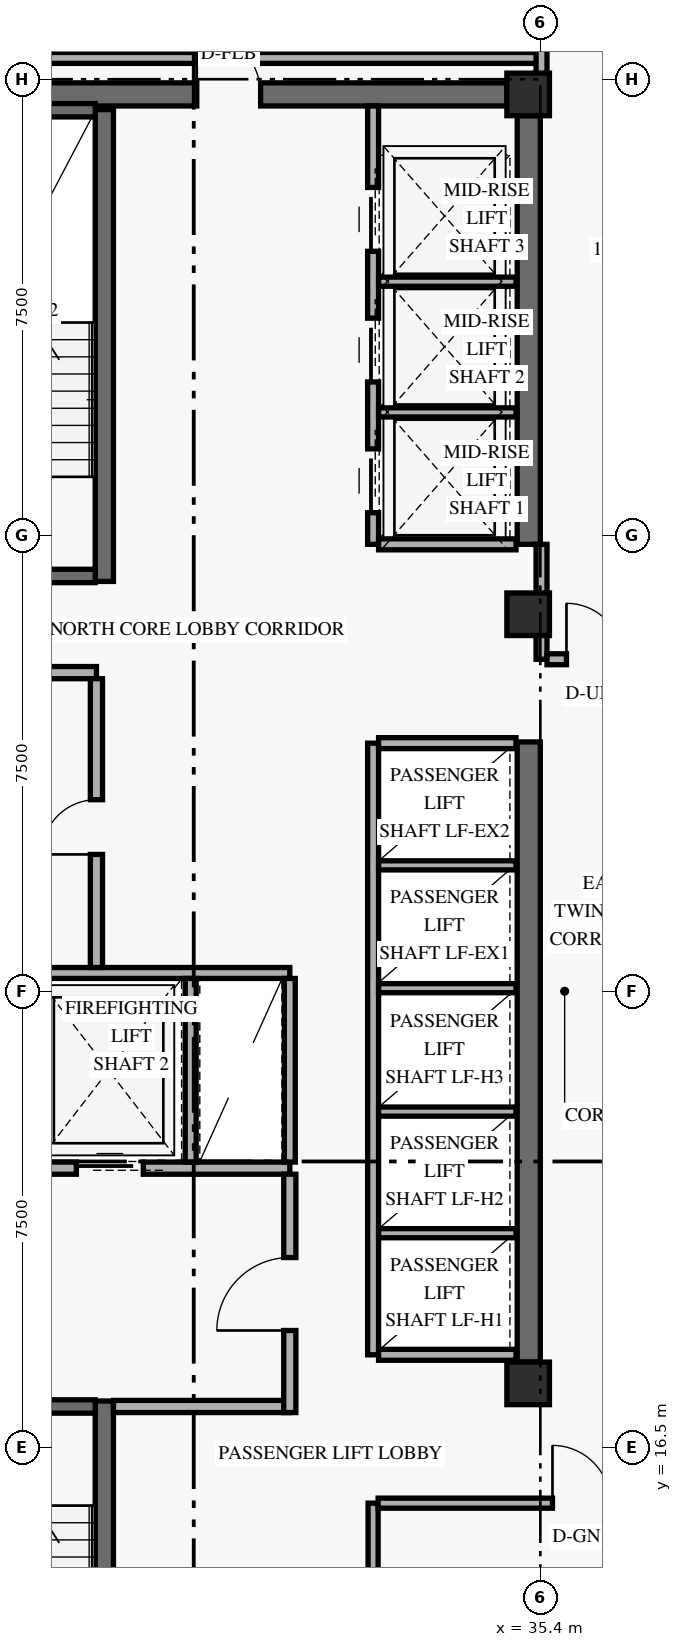
"""IFC4 building model, lengths in metres.
Left out: names, types, materials, properties, quantities, classifications, styles, units other than length and angle.
Written with IfcOpenShell. Run it as: python <this file> out.ifc"""

import sys

from ifc_helpers import new_model, si_unit, direction, frame, frame_2d, origin, origin_2d, place, context, subcontext, project, spatial, rectangle, extrude, element, fill, save


model = new_model("IFC4")
c1 = context("Model", 3, precision=1e-05, world=origin(), true_north=direction((0.0, 1.0)))
c2 = subcontext(c1, "Body", "Model", "MODEL_VIEW")
j1 = project(units=[si_unit("LENGTHUNIT", "METRE"), si_unit("PLANEANGLEUNIT", "RADIAN")], contexts=[c1])
p1 = place(None, origin())
s1 = spatial("IfcSite", under=j1, at=p1, CompositionType="ELEMENT")
p2 = place(p1, origin())
s2 = spatial("IfcBuilding", under=s1, at=p2, CompositionType="ELEMENT")
p3 = place(p2, frame((0.0, 0.0, 166.2)))
s3 = spatial("IfcBuildingStorey", under=s2, at=p3, CompositionType="ELEMENT", Elevation=166.2)
p4 = place(p3, frame((35.21, 17.9, 0.0), z_axis=(0.0, 0.0, 1.0), x_axis=(0.0, 1.0, 0.0)))
e1 = element("IfcWall", 1, at=p4, inside=s3, PredefinedType="SHEAR", context=c2, shape_type="SweptSolid", body=[
    extrude(rectangle(XDim=10.2, YDim=0.38, at=frame_2d((5.1, 0.0))), origin(), (0.0, 0.0, 1.0), 2.748),
])
p5 = place(p3, frame((35.21, 31.35, 0.0), z_axis=(0.0, 0.0, 1.0), x_axis=(0.0, 1.0, 0.0)))
e2 = element("IfcWall", 2, at=p5, inside=s3, PredefinedType="SHEAR", context=c2, shape_type="SweptSolid", body=[
    extrude(rectangle(XDim=7.05, YDim=0.38, at=frame_2d((3.525, 0.0))), origin(), (0.0, 0.0, 1.0), 2.748),
])
p6 = place(p3, frame((24.55, 38.75, 0.0), z_axis=(0.0, 0.0, 1.0), x_axis=(1.0, 0.0, 0.0)))
e3 = element("IfcWall", 3, at=p6, inside=s3, PredefinedType="SHEAR", context=c2, shape_type="SweptSolid", body=[
    extrude(rectangle(XDim=10.3, YDim=0.38, at=frame_2d((5.15, 0.0))), origin(), (0.0, 0.0, 1.0), 3.36),
])
p7 = place(p6, frame((5.2, 0.0, 0.0)))
e4 = element("IfcOpeningElement", 4, at=p7, cuts=e3, PredefinedType="OPENING", context=c2, shape_type="SweptSolid", body=[
    extrude(rectangle(XDim=1.05, YDim=2.15, at=frame_2d((0.525, 1.075))), frame((0.0, 0.2, 0.0), z_axis=(0.0, -1.0, 0.0), x_axis=(1.0, 0.0, 0.0)), (0.0, 0.0, 1.0), 0.4),
])
p8 = place(p3, frame((28.23, 9.5, 0.0), z_axis=(0.0, 0.0, 1.0), x_axis=(0.0, 1.0, 0.0)))
e5 = element("IfcWall", 5, at=p8, inside=s3, PredefinedType="SHEAR", context=c2, shape_type="SweptSolid", body=[
    extrude(rectangle(XDim=7.76, YDim=0.3, at=frame_2d((3.88, 0.0))), origin(), (0.0, 0.0, 1.0), 3.36),
])
p9 = place(p3, frame((24.92, 17.17, 0.0), z_axis=(0.0, 0.0, 1.0), x_axis=(1.0, 0.0, 0.0)))
e6 = element("IfcWall", 6, at=p9, inside=s3, PredefinedType="SHEAR", context=c2, shape_type="SweptSolid", body=[
    extrude(rectangle(XDim=3.16, YDim=0.22, at=frame_2d((1.58, 0.0))), origin(), (0.0, 0.0, 1.0), 3.36),
])
p10 = place(p9, frame((0.78, 0.0, 0.0)))
e7 = element("IfcOpeningElement", 7, at=p10, cuts=e6, PredefinedType="OPENING", context=c2, shape_type="SweptSolid", body=[
    extrude(rectangle(XDim=1.05, YDim=2.15, at=frame_2d((0.525, 1.075))), frame((0.0, 0.12, 0.0), z_axis=(0.0, -1.0, 0.0), x_axis=(1.0, 0.0, 0.0)), (0.0, 0.0, 1.0), 0.24),
])
p11 = place(p3, frame((28.23, 30.74, 0.0), z_axis=(0.0, 0.0, 1.0), x_axis=(0.0, 1.0, 0.0)))
e8 = element("IfcWall", 8, at=p11, inside=s3, PredefinedType="SHEAR", context=c2, shape_type="SweptSolid", body=[
    extrude(rectangle(XDim=7.76, YDim=0.3, at=frame_2d((3.88, 0.0))), origin(), (0.0, 0.0, 1.0), 3.36),
])
p12 = place(p3, frame((24.92, 30.83, 0.0), z_axis=(0.0, 0.0, 1.0), x_axis=(1.0, 0.0, 0.0)))
e9 = element("IfcWall", 9, at=p12, inside=s3, PredefinedType="SHEAR", context=c2, shape_type="SweptSolid", body=[
    extrude(rectangle(XDim=3.16, YDim=0.22, at=frame_2d((1.58, 0.0))), origin(), (0.0, 0.0, 1.0), 3.36),
])
p13 = place(p12, frame((0.78, 0.0, 0.0)))
e10 = element("IfcOpeningElement", 10, at=p13, cuts=e9, PredefinedType="OPENING", context=c2, shape_type="SweptSolid", body=[
    extrude(rectangle(XDim=1.05, YDim=2.15, at=frame_2d((0.525, 1.075))), frame((0.0, 0.12, 0.0), z_axis=(0.0, -1.0, 0.0), x_axis=(1.0, 0.0, 0.0)), (0.0, 0.0, 1.0), 0.24),
])
p14 = place(p3, frame((24.92, 38.49, 0.0), z_axis=(0.0, 0.0, 1.0), x_axis=(1.0, 0.0, 0.0)))
e11 = element("IfcWall", 11, at=p14, inside=s3, PredefinedType="SHEAR", context=c2, shape_type="SweptSolid", body=[
    extrude(rectangle(XDim=3.16, YDim=0.22, at=frame_2d((1.58, 0.0))), origin(), (0.0, 0.0, 1.0), 3.36),
])
for number, where, z_axis, x_axis in (
    (12, (35.2, 17.55, 0.0), (0.0, 0.0, 1.0), (1.0, 0.0, 0.0)),
    (13, (35.2, 30.2, 0.0), (0.0, 0.0, 1.0), (1.0, 0.0, 0.0)),
    (14, (35.2, 38.75, 0.0), (0.0, 0.0, 1.0), (1.0, 0.0, 0.0)),
):
    element("IfcColumn", number, at=place(p3, frame(where, z_axis=z_axis, x_axis=x_axis)), inside=s3, PredefinedType="COLUMN", context=c2, shape_type="SweptSolid", body=[
        extrude(rectangle(XDim=0.7, YDim=0.7, at=origin_2d()), origin(), (0.0, 0.0, 1.0), 3.6),
    ])
p15 = place(p3, frame((24.45, 21.09, 0.0), z_axis=(0.0, 0.0, 1.0), x_axis=(1.0, 0.0, 0.0)))
e15 = element("IfcWall", 15, at=p15, inside=s3, PredefinedType="STANDARD", context=c2, shape_type="SweptSolid", body=[
    extrude(rectangle(XDim=6.83, YDim=0.2, at=frame_2d((3.415, 0.0))), origin(), (0.0, 0.0, 1.0), 3.36),
])
p16 = place(p15, frame((0.72, 0.0, 0.0)))
e16 = element("IfcOpeningElement", 16, at=p16, cuts=e15, PredefinedType="OPENING", context=c2, shape_type="SweptSolid", body=[
    extrude(rectangle(XDim=1.1, YDim=2.2, at=frame_2d((0.55, 1.1))), frame((0.0, 0.11, 0.0), z_axis=(0.0, -1.0, 0.0), x_axis=(1.0, 0.0, 0.0)), (0.0, 0.0, 1.0), 0.22),
])
p17 = place(p15, frame((3.32, 0.0, 0.0)))
e17 = element("IfcOpeningElement", 17, at=p17, cuts=e15, PredefinedType="OPENING", context=c2, shape_type="SweptSolid", body=[
    extrude(rectangle(XDim=1.1, YDim=2.2, at=frame_2d((0.55, 1.1))), frame((0.0, 0.11, 0.0), z_axis=(0.0, -1.0, 0.0), x_axis=(1.0, 0.0, 0.0)), (0.0, 0.0, 1.0), 0.22),
])
p18 = place(p3, frame((28.38, 17.17, 0.0), z_axis=(0.0, 0.0, 1.0), x_axis=(1.0, 0.0, 0.0)))
e18 = element("IfcWall", 18, at=p18, inside=s3, PredefinedType="STANDARD", context=c2, shape_type="SweptSolid", body=[
    extrude(rectangle(XDim=2.9, YDim=0.2, at=frame_2d((1.45, 0.0))), origin(), (0.0, 0.0, 1.0), 3.36),
])
p19 = place(p3, frame((31.28, 17.07, 0.0), z_axis=(0.0, 0.0, 1.0), x_axis=(0.0, 1.0, 0.0)))
e19 = element("IfcWall", 19, at=p19, inside=s3, PredefinedType="STANDARD", context=c2, shape_type="SweptSolid", body=[
    extrude(rectangle(XDim=3.92, YDim=0.2, at=frame_2d((1.96, 0.0))), origin(), (0.0, 0.0, 1.0), 2.73),
])
p20 = place(p19, frame((1.35, 0.0, 0.0)))
e20 = element("IfcOpeningElement", 20, at=p20, cuts=e19, PredefinedType="OPENING", context=c2, shape_type="SweptSolid", body=[
    extrude(rectangle(XDim=1.2, YDim=2.15, at=frame_2d((0.6, 1.075))), frame((0.0, 0.11, 0.0), z_axis=(0.0, -1.0, 0.0), x_axis=(1.0, 0.0, 0.0)), (0.0, 0.0, 1.0), 0.22),
])
p21 = place(p3, frame((24.45, 24.3, 0.0), z_axis=(0.0, 0.0, 1.0), x_axis=(1.0, 0.0, 0.0)))
e21 = element("IfcWall", 21, at=p21, inside=s3, PredefinedType="STANDARD", context=c2, shape_type="SweptSolid", body=[
    extrude(rectangle(XDim=6.83, YDim=0.18, at=frame_2d((3.415, 0.0))), origin(), (0.0, 0.0, 1.0), 3.36),
])
for number, where, z_axis, x_axis in (
    (22, (29.65, 21.19, 0.0), (0.0, 0.0, 1.0), (0.0, 1.0, 0.0)),
    (23, (31.28, 21.19, 0.0), (0.0, 0.0, 1.0), (0.0, 1.0, 0.0)),
):
    element("IfcWall", number, at=place(p3, frame(where, z_axis=z_axis, x_axis=x_axis)), inside=s3, PredefinedType="STANDARD", context=c2, shape_type="SweptSolid", body=[
        extrude(rectangle(XDim=3.02, YDim=0.18, at=frame_2d((1.51, 0.0))), origin(), (0.0, 0.0, 1.0), 3.36),
    ])
p22 = place(p3, frame((24.45, 29.24, 0.0), z_axis=(0.0, 0.0, 1.0), x_axis=(1.0, 0.0, 0.0)))
e24 = element("IfcWall", 24, at=p22, inside=s3, PredefinedType="STANDARD", context=c2, shape_type="SweptSolid", body=[
    extrude(rectangle(XDim=3.65, YDim=0.2, at=frame_2d((1.825, 0.0))), origin(), (0.0, 0.0, 1.0), 3.36),
])
p23 = place(p3, frame((28.1, 24.39, 0.0), z_axis=(0.0, 0.0, 1.0), x_axis=(0.0, 1.0, 0.0)))
e25 = element("IfcWall", 25, at=p23, inside=s3, PredefinedType="STANDARD", context=c2, shape_type="SweptSolid", body=[
    extrude(rectangle(XDim=4.75, YDim=0.2, at=frame_2d((2.375, 0.0))), origin(), (0.0, 0.0, 1.0), 3.36),
])
p24 = place(p23, frame((1.86, 0.0, 0.0)))
e26 = element("IfcOpeningElement", 26, at=p24, cuts=e25, PredefinedType="OPENING", context=c2, shape_type="SweptSolid", body=[
    extrude(rectangle(XDim=0.9, YDim=2.1, at=frame_2d((0.45, 1.05))), frame((0.0, 0.11, 0.0), z_axis=(0.0, -1.0, 0.0), x_axis=(1.0, 0.0, 0.0)), (0.0, 0.0, 1.0), 0.22),
])
p25 = place(p3, frame((32.65, 18.02, 0.0), z_axis=(0.0, 0.0, 1.0), x_axis=(0.0, 1.0, 0.0)))
e27 = element("IfcWall", 27, at=p25, inside=s3, PredefinedType="STANDARD", context=c2, shape_type="SweptSolid", body=[
    extrude(rectangle(XDim=10.06, YDim=0.18, at=frame_2d((5.03, 0.0))), origin(), (0.0, 0.0, 1.0), 3.36),
])
for number, where, z_axis, x_axis in (
    (28, (32.74, 18.02, 0.0), (0.0, 0.0, 1.0), (1.0, 0.0, 0.0)),
    (29, (32.74, 28.08, 0.0), (0.0, 0.0, 1.0), (1.0, 0.0, 0.0)),
):
    element("IfcWall", number, at=place(p3, frame(where, z_axis=z_axis, x_axis=x_axis)), inside=s3, PredefinedType="STANDARD", context=c2, shape_type="SweptSolid", body=[
        extrude(rectangle(XDim=2.26, YDim=0.18, at=frame_2d((1.13, 0.0))), origin(), (0.0, 0.0, 1.0), 3.36),
    ])
for number, where, z_axis, x_axis in (
    (30, (32.74, 20.02, 0.0), (0.0, 0.0, 1.0), (1.0, 0.0, 0.0)),
    (31, (32.74, 22.02, 0.0), (0.0, 0.0, 1.0), (1.0, 0.0, 0.0)),
    (32, (32.74, 24.05, 0.0), (0.0, 0.0, 1.0), (1.0, 0.0, 0.0)),
    (33, (32.74, 26.07, 0.0), (0.0, 0.0, 1.0), (1.0, 0.0, 0.0)),
):
    element("IfcWall", number, at=place(p3, frame(where, z_axis=z_axis, x_axis=x_axis)), inside=s3, PredefinedType="STANDARD", context=c2, shape_type="SweptSolid", body=[
        extrude(rectangle(XDim=2.26, YDim=0.15, at=frame_2d((1.13, 0.0))), origin(), (0.0, 0.0, 1.0), 3.36),
    ])
p26 = place(p3, frame((32.65, 31.35, 0.0), z_axis=(0.0, 0.0, 1.0), x_axis=(0.0, 1.0, 0.0)))
e34 = element("IfcWall", 34, at=p26, inside=s3, PredefinedType="STANDARD", context=c2, shape_type="SweptSolid", body=[
    extrude(rectangle(XDim=7.21, YDim=0.18, at=frame_2d((3.605, 0.0))), origin(), (0.0, 0.0, 1.0), 3.36),
])
p27 = place(p26, frame((0.52, 0.0, 0.0)))
e35 = element("IfcOpeningElement", 35, at=p27, cuts=e34, PredefinedType="OPENING", context=c2, shape_type="SweptSolid", body=[
    extrude(rectangle(XDim=1.05, YDim=2.2, at=frame_2d((0.525, 1.1))), frame((0.0, 0.1, 0.0), z_axis=(0.0, -1.0, 0.0), x_axis=(1.0, 0.0, 0.0)), (0.0, 0.0, 1.0), 0.2),
])
p28 = place(p26, frame((2.67, 0.0, 0.0)))
e36 = element("IfcOpeningElement", 36, at=p28, cuts=e34, PredefinedType="OPENING", context=c2, shape_type="SweptSolid", body=[
    extrude(rectangle(XDim=1.05, YDim=2.2, at=frame_2d((0.525, 1.1))), frame((0.0, 0.1, 0.0), z_axis=(0.0, -1.0, 0.0), x_axis=(1.0, 0.0, 0.0)), (0.0, 0.0, 1.0), 0.2),
])
p29 = place(p26, frame((4.82, 0.0, 0.0)))
e37 = element("IfcOpeningElement", 37, at=p29, cuts=e34, PredefinedType="OPENING", context=c2, shape_type="SweptSolid", body=[
    extrude(rectangle(XDim=1.05, YDim=2.2, at=frame_2d((0.525, 1.1))), frame((0.0, 0.1, 0.0), z_axis=(0.0, -1.0, 0.0), x_axis=(1.0, 0.0, 0.0)), (0.0, 0.0, 1.0), 0.2),
])
p30 = place(p3, frame((32.74, 31.35, 0.0), z_axis=(0.0, 0.0, 1.0), x_axis=(1.0, 0.0, 0.0)))
e38 = element("IfcWall", 38, at=p30, inside=s3, PredefinedType="STANDARD", context=c2, shape_type="SweptSolid", body=[
    extrude(rectangle(XDim=2.26, YDim=0.18, at=frame_2d((1.13, 0.0))), origin(), (0.0, 0.0, 1.0), 3.36),
])
for number, where, z_axis, x_axis in (
    (39, (32.74, 33.52, 0.0), (0.0, 0.0, 1.0), (1.0, 0.0, 0.0)),
    (40, (32.74, 35.67, 0.0), (0.0, 0.0, 1.0), (1.0, 0.0, 0.0)),
):
    element("IfcWall", number, at=place(p3, frame(where, z_axis=z_axis, x_axis=x_axis)), inside=s3, PredefinedType="STANDARD", context=c2, shape_type="SweptSolid", body=[
        extrude(rectangle(XDim=2.26, YDim=0.15, at=frame_2d((1.13, 0.0))), origin(), (0.0, 0.0, 1.0), 3.36),
    ])
p31 = place(p3, frame((32.65, 9.5, 0.0), z_axis=(0.0, 0.0, 1.0), x_axis=(0.0, 1.0, 0.0)))
e41 = element("IfcWall", 41, at=p31, inside=s3, PredefinedType="PARTITIONING", context=c2, shape_type="SweptSolid", body=[
    extrude(rectangle(XDim=6.08, YDim=0.165, at=frame_2d((3.04, 0.0))), origin(), (0.0, 0.0, 1.0), 3.36),
])
p32 = place(p3, frame((32.732, 15.58, 0.0), z_axis=(0.0, 0.0, 1.0), x_axis=(1.0, 0.0, 0.0)))
e42 = element("IfcWall", 42, at=p32, inside=s3, PredefinedType="PARTITIONING", context=c2, shape_type="SweptSolid", body=[
    extrude(rectangle(XDim=5.218, YDim=0.165, at=frame_2d((2.609, 0.0))), origin(), (0.0, 0.0, 1.0), 2.73),
])
p33 = place(p32, frame((2.867, 0.0, 0.0)))
e43 = element("IfcOpeningElement", 43, at=p33, cuts=e42, PredefinedType="OPENING", context=c2, shape_type="SweptSolid", body=[
    extrude(rectangle(XDim=0.95, YDim=2.15, at=frame_2d((0.475, 1.075))), frame((0.0, 0.093, 0.0), z_axis=(0.0, -1.0, 0.0), x_axis=(1.0, 0.0, 0.0)), (0.0, 0.0, 1.0), 0.185),
])
p34 = place(p3, frame((35.42, 29.46, 0.0), z_axis=(0.0, 0.0, 1.0), x_axis=(0.0, 1.0, 0.0)))
e44 = element("IfcWall", 44, at=p34, inside=s3, PredefinedType="STANDARD", context=c2, shape_type="SweptSolid", body=[
    extrude(rectangle(XDim=1.89, YDim=0.18, at=frame_2d((0.945, 0.0))), origin(), (0.0, 0.0, 1.0), 2.73),
])
p35 = place(p3, frame((35.51, 29.46, 0.0), z_axis=(0.0, 0.0, 1.0), x_axis=(1.0, 0.0, 0.0)))
e45 = element("IfcWall", 45, at=p35, inside=s3, PredefinedType="STANDARD", context=c2, shape_type="SweptSolid", body=[
    extrude(rectangle(XDim=10.956, YDim=0.18, at=frame_2d((5.478, 0.0))), origin(), (0.0, 0.0, 1.0), 2.73),
])
p36 = place(p35, frame((0.32, 0.0, 0.0)))
e46 = element("IfcOpeningElement", 46, at=p36, cuts=e45, PredefinedType="OPENING", context=c2, shape_type="SweptSolid", body=[
    extrude(rectangle(XDim=0.92, YDim=2.15, at=frame_2d((0.46, 1.075))), frame((0.0, 0.1, 0.0), z_axis=(0.0, -1.0, 0.0), x_axis=(1.0, 0.0, 0.0)), (0.0, 0.0, 1.0), 0.2),
])
p37 = place(p3, frame((23.85, 39.35, 0.0), z_axis=(0.0, 0.0, 1.0), x_axis=(1.0, 0.0, 0.0)))
e47 = element("IfcWall", 47, at=p37, inside=s3, PredefinedType="STANDARD", context=c2, shape_type="SweptSolid", body=[
    extrude(rectangle(XDim=11.57, YDim=0.18, at=frame_2d((5.785, 0.0))), origin(), (0.0, 0.0, 1.0), 2.73),
])
p38 = place(p3, frame((35.42, 38.75, 0.0), z_axis=(0.0, 0.0, 1.0), x_axis=(0.0, 1.0, 0.0)))
e48 = element("IfcWall", 48, at=p38, inside=s3, PredefinedType="PARTITIONING", context=c2, shape_type="SweptSolid", body=[
    extrude(rectangle(XDim=4.97, YDim=0.18, at=frame_2d((2.485, 0.0))), origin(), (0.0, 0.0, 1.0), 2.73),
])
p39 = place(p17, origin())
e49 = element("IfcDoor", 49, at=p39, inside=s3, OperationType="SLIDING_TO_LEFT", PredefinedType="DOOR", context=c2, shape_type="SweptSolid", body=[
    extrude(rectangle(XDim=1.1, YDim=2.2, at=frame_2d((0.55, 1.1))), frame((0.0, 0.025, 0.0), z_axis=(0.0, -1.0, 0.0), x_axis=(1.0, 0.0, 0.0)), (0.0, 0.0, 1.0), 0.05),
])
fill(e17, e49)
p40 = place(p20, origin())
e50 = element("IfcDoor", 50, at=p40, inside=s3, OperationType="SINGLE_SWING_LEFT", PredefinedType="DOOR", context=c2, shape_type="SweptSolid", body=[
    extrude(rectangle(XDim=1.2, YDim=2.15, at=frame_2d((0.6, 1.075))), frame((0.0, 0.025, 0.0), z_axis=(0.0, -1.0, 0.0), x_axis=(1.0, 0.0, 0.0)), (0.0, 0.0, 1.0), 0.05),
])
fill(e20, e50)
p41 = place(p24, origin())
e51 = element("IfcDoor", 51, at=p41, inside=s3, OperationType="SINGLE_SWING_LEFT", PredefinedType="DOOR", context=c2, shape_type="SweptSolid", body=[
    extrude(rectangle(XDim=0.9, YDim=2.1, at=frame_2d((0.45, 1.05))), frame((0.0, 0.025, 0.0), z_axis=(0.0, -1.0, 0.0), x_axis=(1.0, 0.0, 0.0)), (0.0, 0.0, 1.0), 0.05),
])
fill(e26, e51)
p42 = place(p27, origin())
e52 = element("IfcDoor", 52, at=p42, inside=s3, OperationType="SLIDING_TO_LEFT", PredefinedType="DOOR", context=c2, shape_type="SweptSolid", body=[
    extrude(rectangle(XDim=1.05, YDim=2.2, at=frame_2d((0.525, 1.1))), frame((0.0, 0.025, 0.0), z_axis=(0.0, -1.0, 0.0), x_axis=(1.0, 0.0, 0.0)), (0.0, 0.0, 1.0), 0.05),
])
fill(e35, e52)
p43 = place(p28, origin())
e53 = element("IfcDoor", 53, at=p43, inside=s3, OperationType="SLIDING_TO_LEFT", PredefinedType="DOOR", context=c2, shape_type="SweptSolid", body=[
    extrude(rectangle(XDim=1.05, YDim=2.2, at=frame_2d((0.525, 1.1))), frame((0.0, 0.025, 0.0), z_axis=(0.0, -1.0, 0.0), x_axis=(1.0, 0.0, 0.0)), (0.0, 0.0, 1.0), 0.05),
])
fill(e36, e53)
p44 = place(p29, origin())
e54 = element("IfcDoor", 54, at=p44, inside=s3, OperationType="SLIDING_TO_LEFT", PredefinedType="DOOR", context=c2, shape_type="SweptSolid", body=[
    extrude(rectangle(XDim=1.05, YDim=2.2, at=frame_2d((0.525, 1.1))), frame((0.0, 0.025, 0.0), z_axis=(0.0, -1.0, 0.0), x_axis=(1.0, 0.0, 0.0)), (0.0, 0.0, 1.0), 0.05),
])
fill(e37, e54)
p45 = place(p33, origin())
e55 = element("IfcDoor", 55, at=p45, inside=s3, OperationType="SINGLE_SWING_LEFT", PredefinedType="DOOR", context=c2, shape_type="SweptSolid", body=[
    extrude(rectangle(XDim=0.95, YDim=2.15, at=frame_2d((0.475, 1.075))), frame((0.0, 0.025, 0.0), z_axis=(0.0, -1.0, 0.0), x_axis=(1.0, 0.0, 0.0)), (0.0, 0.0, 1.0), 0.05),
])
fill(e43, e55)
p46 = place(p7, frame((1.05, 0.0, 0.0), z_axis=(0.0, 0.0, 1.0), x_axis=(-1.0, 0.0, 0.0)))
e56 = element("IfcDoor", 56, at=p46, inside=s3, OperationType="SINGLE_SWING_RIGHT", PredefinedType="DOOR", context=c2, shape_type="SweptSolid", body=[
    extrude(rectangle(XDim=1.05, YDim=2.15, at=frame_2d((0.525, 1.075))), frame((0.0, 0.025, 0.0), z_axis=(0.0, -1.0, 0.0), x_axis=(1.0, 0.0, 0.0)), (0.0, 0.0, 1.0), 0.05),
])
fill(e4, e56)
p47 = place(p36, origin())
e57 = element("IfcDoor", 57, at=p47, inside=s3, OperationType="SINGLE_SWING_LEFT", PredefinedType="DOOR", context=c2, shape_type="SweptSolid", body=[
    extrude(rectangle(XDim=0.92, YDim=2.15, at=frame_2d((0.46, 1.075))), frame((0.0, 0.025, 0.0), z_axis=(0.0, -1.0, 0.0), x_axis=(1.0, 0.0, 0.0)), (0.0, 0.0, 1.0), 0.05),
])
fill(e46, e57)
save(model, sys.argv[1])
